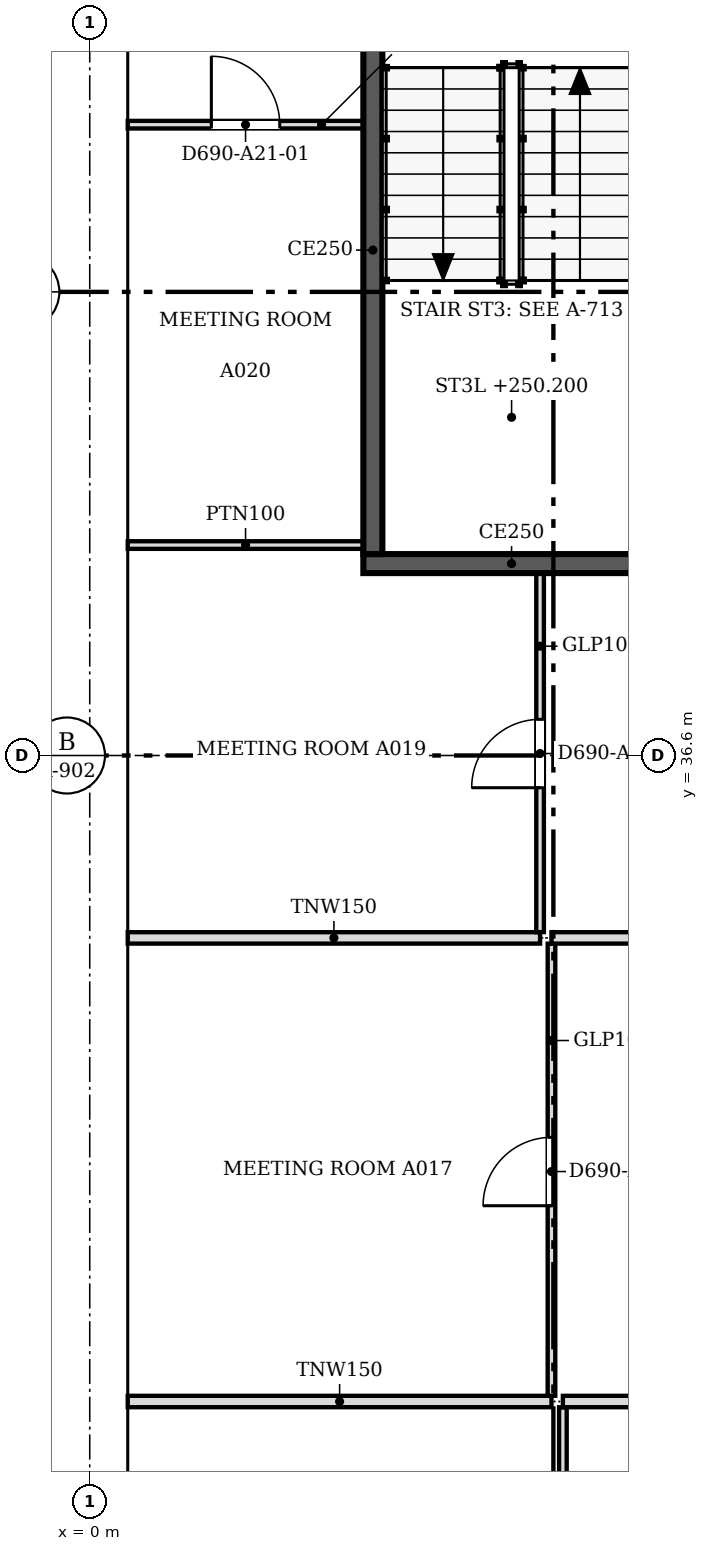
"""IFC4 building model, lengths in metres.
Left out: names, types, materials, properties, quantities, classifications, styles, units other than length and angle.
Written with IfcOpenShell. Run it as: python <this file> out.ifc"""

import sys

from ifc_helpers import new_model, si_unit, direction, frame, frame_2d, origin, place, context, subcontext, project, spatial, polyline, rectangle, outline, extrude, faceted_brep, source, transform, mapped, element, fill, save


model = new_model("IFC4")
c1 = context("Model", 3, precision=1e-05, world=origin(), true_north=direction((0.0, 1.0)))
c2 = subcontext(c1, "Body", "Model", "MODEL_VIEW")
j1 = project(units=[si_unit("LENGTHUNIT", "METRE"), si_unit("PLANEANGLEUNIT", "RADIAN")], contexts=[c1])
p1 = place(None, origin())
s1 = spatial("IfcSite", under=j1, at=p1, CompositionType="ELEMENT")
p2 = place(p1, origin())
s2 = spatial("IfcBuilding", under=s1, at=p2, CompositionType="ELEMENT")
p3 = place(p2, frame((0.0, 0.0, 248.3)))
s3 = spatial("IfcBuildingStorey", under=s2, at=p3, CompositionType="ELEMENT", Elevation=248.3)
m1 = source(origin(), c2, "Body", "Brep", [
    faceted_brep([(0.047, -0.25, 0.0), (3.05, -0.25, 3.8), (0.047, -0.25, 7.6), (0.0, -0.25, 7.54), (0.0, -0.25, 0.06), (0.093, 0.25, 7.541), (3.05, 0.25, 3.8), (0.093, 0.25, 0.059), (0.047, 0.0, 0.0), (0.047, 0.0, 7.6)], [[[0, 1, 2, 3, 4]], [[5, 6, 7]], [[7, 6, 1, 0, 8]], [[6, 5, 9, 2, 1]], [[3, 2, 9]], [[8, 0, 4]], [[7, 8, 4, 3, 9, 5]]]),
])
p4 = place(p3, frame((0.25, 48.8, -3.8), z_axis=(0.0, 0.0, 1.0), x_axis=(0.0, -1.0, 0.0)))
e1 = element("IfcWall", 1, at=p4, inside=s3, PredefinedType="SOLIDWALL", context=c2, shape_type="MappedRepresentation", body=[
    mapped(m1, transform((0.0, 0.0, 0.0), scale=1.0)),
])
m2 = source(origin(), c2, "Body", "SweptSolid", [
    extrude(outline(polyline([(0.247, 0.656), (2.731, 3.8), (0.247, 6.944), (0.247, 0.656)])), frame((0.0, 0.26, 0.0), z_axis=(0.0, -1.0, 0.0), x_axis=(1.0, 0.0, 0.0)), (0.0, 0.0, 1.0), 0.52),
])
p5 = place(p4, origin())
e2 = element("IfcOpeningElement", 2, at=p5, cuts=e1, PredefinedType="OPENING", context=c2, shape_type="MappedRepresentation", body=[
    mapped(m2, transform((0.0, 0.0, 0.0), scale=1.0)),
])
m3 = source(origin(), c2, "Body", "SweptSolid", [
    extrude(outline(polyline([(3.05, 0.0), (6.1, 3.8), (3.05, 7.6), (0.0, 3.8), (3.05, 0.0)])), frame((0.0, 0.25, 0.0), z_axis=(0.0, -1.0, 0.0), x_axis=(1.0, 0.0, 0.0)), (0.0, 0.0, 1.0), 0.5),
])
p6 = place(p3, frame((0.25, 45.75, -3.8), z_axis=(0.0, 0.0, 1.0), x_axis=(0.0, -1.0, 0.0)))
e3 = element("IfcWall", 3, at=p6, inside=s3, PredefinedType="SOLIDWALL", context=c2, shape_type="MappedRepresentation", body=[
    mapped(m3, transform((0.0, 0.0, 0.0), scale=1.0)),
])
m4 = source(origin(), c2, "Body", "SweptSolid", [
    extrude(outline(polyline([(3.05, 0.399), (5.78, 3.8), (3.05, 7.201), (0.321, 3.8), (3.05, 0.399)])), frame((0.0, 0.26, 0.0), z_axis=(0.0, -1.0, 0.0), x_axis=(1.0, 0.0, 0.0)), (0.0, 0.0, 1.0), 0.52),
])
p7 = place(p6, origin())
e4 = element("IfcOpeningElement", 4, at=p7, cuts=e3, PredefinedType="OPENING", context=c2, shape_type="MappedRepresentation", body=[
    mapped(m4, transform((0.0, 0.0, 0.0), scale=1.0)),
])
m5 = source(origin(), c2, "Body", "Brep", [
    faceted_brep([(3.05, -0.25, 0.0), (6.1, -0.25, 3.8), (6.1, -0.25, 3.8), (3.05, -0.25, 7.6), (0.0, -0.25, 3.8), (0.0, 0.25, 3.8), (3.05, 0.25, 7.6), (6.1, 0.25, 3.8), (6.1, 0.25, 3.8), (3.05, 0.25, 0.0)], [[[0, 1, 2, 3, 4]], [[5, 6, 7, 8, 9]], [[9, 8, 1, 0]], [[7, 6, 3, 2]], [[6, 5, 4, 3]], [[5, 9, 0, 4]], [[1, 8, 7, 2]]]),
])
p8 = place(p3, frame((0.25, 39.65, -3.8), z_axis=(0.0, 0.0, 1.0), x_axis=(0.0, -1.0, 0.0)))
e5 = element("IfcWall", 5, at=p8, inside=s3, PredefinedType="SOLIDWALL", context=c2, shape_type="MappedRepresentation", body=[
    mapped(m5, transform((0.0, 0.0, 0.0), scale=1.0)),
])
p9 = place(p8, origin())
e6 = element("IfcOpeningElement", 6, at=p9, cuts=e5, PredefinedType="OPENING", context=c2, shape_type="MappedRepresentation", body=[
    mapped(m4, transform((0.0, 0.0, 0.0), scale=1.0)),
])
p10 = place(p3, frame((0.25, 33.55, -3.8), z_axis=(0.0, 0.0, 1.0), x_axis=(0.0, -1.0, 0.0)))
e7 = element("IfcWall", 7, at=p10, inside=s3, PredefinedType="SOLIDWALL", context=c2, shape_type="MappedRepresentation", body=[
    mapped(m3, transform((0.0, 0.0, 0.0), scale=1.0)),
])
p11 = place(p10, origin())
e8 = element("IfcOpeningElement", 8, at=p11, cuts=e7, PredefinedType="OPENING", context=c2, shape_type="MappedRepresentation", body=[
    mapped(m4, transform((0.0, 0.0, 0.0), scale=1.0)),
])
m6 = source(origin(), c2, "Body", "Brep", [
    faceted_brep([(3.003, -0.25, 0.0), (3.05, -0.25, 0.06), (3.05, -0.25, 7.54), (3.003, -0.25, 7.6), (0.0, -0.25, 3.8), (0.0, 0.25, 3.8), (2.957, 0.25, 7.541), (2.957, 0.25, 0.059), (3.003, 0.0, 0.0), (3.003, 0.0, 7.6)], [[[0, 1, 2, 3, 4]], [[5, 6, 7]], [[1, 0, 8]], [[9, 3, 2]], [[6, 5, 4, 3, 9]], [[5, 7, 8, 0, 4]], [[1, 8, 7, 6, 9, 2]]]),
])
p12 = place(p3, frame((0.25, 27.45, -3.8), z_axis=(0.0, 0.0, 1.0), x_axis=(0.0, -1.0, 0.0)))
e9 = element("IfcWall", 9, at=p12, inside=s3, PredefinedType="SOLIDWALL", context=c2, shape_type="MappedRepresentation", body=[
    mapped(m6, transform((0.0, 0.0, 0.0), scale=1.0)),
])
m7 = source(origin(), c2, "Body", "SweptSolid", [
    extrude(outline(polyline([(2.803, 6.944), (0.319, 3.8), (2.803, 0.656), (2.803, 6.944)])), frame((0.0, 0.26, 0.0), z_axis=(0.0, -1.0, 0.0), x_axis=(1.0, 0.0, 0.0)), (0.0, 0.0, 1.0), 0.52),
])
p13 = place(p12, origin())
e10 = element("IfcOpeningElement", 10, at=p13, cuts=e9, PredefinedType="OPENING", context=c2, shape_type="MappedRepresentation", body=[
    mapped(m7, transform((0.0, 0.0, 0.0), scale=1.0)),
])
p14 = place(p2, frame((0.0, 0.0, 252.1)))
s4 = spatial("IfcBuildingStorey", under=s2, at=p14, CompositionType="ELEMENT", Elevation=252.1)
m8 = source(origin(), c2, "Body", "Brep", [
    faceted_brep([(3.003, -0.25, 0.0), (6.053, -0.25, 3.8), (3.003, -0.25, 7.6), (0.0, -0.25, 3.8), (0.047, 0.25, 3.859), (3.003, 0.25, 7.6), (6.053, 0.25, 3.8), (3.003, 0.25, 0.0), (0.047, 0.25, 3.741), (0.0, 0.0, 3.8)], [[[0, 1, 2, 3]], [[4, 5, 6, 7, 8]], [[7, 6, 1, 0]], [[6, 5, 2, 1]], [[5, 4, 9, 3, 2]], [[8, 7, 0, 3, 9]], [[8, 9, 4]]]),
])
p15 = place(p14, frame((0.25, 48.753, -3.8), z_axis=(0.0, 0.0, 1.0), x_axis=(0.0, -1.0, 0.0)))
e11 = element("IfcWall", 11, at=p15, inside=s4, PredefinedType="SOLIDWALL", context=c2, shape_type="MappedRepresentation", body=[
    mapped(m8, transform((0.0, 0.0, 0.0), scale=1.0)),
])
m9 = source(origin(), c2, "Body", "SweptSolid", [
    extrude(outline(polyline([(3.005, 0.401), (5.733, 3.8), (3.005, 7.199), (0.319, 3.8), (3.005, 0.401)])), frame((0.0, 0.26, 0.0), z_axis=(0.0, -1.0, 0.0), x_axis=(1.0, 0.0, 0.0)), (0.0, 0.0, 1.0), 0.52),
])
p16 = place(p15, origin())
e12 = element("IfcOpeningElement", 12, at=p16, cuts=e11, PredefinedType="OPENING", context=c2, shape_type="MappedRepresentation", body=[
    mapped(m9, transform((0.0, 0.0, 0.0), scale=1.0)),
])
m10 = source(origin(), c2, "Body", "Brep", [
    faceted_brep([(3.05, -0.25, 0.0), (6.1, -0.25, 3.8), (6.1, -0.25, 3.8), (3.05, -0.25, 7.6), (0.0, -0.25, 3.8), (0.0, 0.25, 3.8), (3.05, 0.25, 7.6), (6.1, 0.25, 3.8), (6.1, 0.25, 3.8), (3.05, 0.25, 0.0)], [[[0, 1, 2, 3, 4]], [[5, 6, 7, 8, 9]], [[9, 8, 1, 0]], [[7, 6, 3, 2]], [[6, 5, 4, 3]], [[5, 9, 0, 4]], [[1, 8, 7, 2]]]),
])
p17 = place(p14, frame((0.25, 42.7, -3.8), z_axis=(0.0, 0.0, 1.0), x_axis=(0.0, -1.0, 0.0)))
e13 = element("IfcWall", 13, at=p17, inside=s4, PredefinedType="SOLIDWALL", context=c2, shape_type="MappedRepresentation", body=[
    mapped(m10, transform((0.0, 0.0, 0.0), scale=1.0)),
])
m11 = source(origin(), c2, "Body", "SweptSolid", [
    extrude(outline(polyline([(3.05, 0.399), (5.78, 3.8), (3.05, 7.2), (0.321, 3.8), (3.05, 0.399)])), frame((0.0, 0.26, 0.0), z_axis=(0.0, -1.0, 0.0), x_axis=(1.0, 0.0, 0.0)), (0.0, 0.0, 1.0), 0.52),
])
p18 = place(p17, origin())
e14 = element("IfcOpeningElement", 14, at=p18, cuts=e13, PredefinedType="OPENING", context=c2, shape_type="MappedRepresentation", body=[
    mapped(m11, transform((0.0, 0.0, 0.0), scale=1.0)),
])
m12 = source(origin(), c2, "Body", "SweptSolid", [
    extrude(outline(polyline([(3.05, 0.0), (6.1, 3.8), (3.05, 7.6), (0.0, 3.8), (3.05, 0.0)])), frame((0.0, 0.25, 0.0), z_axis=(0.0, -1.0, 0.0), x_axis=(1.0, 0.0, 0.0)), (0.0, 0.0, 1.0), 0.5),
])
p19 = place(p14, frame((0.25, 36.6, -3.8), z_axis=(0.0, 0.0, 1.0), x_axis=(0.0, -1.0, 0.0)))
e15 = element("IfcWall", 15, at=p19, inside=s4, PredefinedType="SOLIDWALL", context=c2, shape_type="MappedRepresentation", body=[
    mapped(m12, transform((0.0, 0.0, 0.0), scale=1.0)),
])
p20 = place(p19, origin())
e16 = element("IfcOpeningElement", 16, at=p20, cuts=e15, PredefinedType="OPENING", context=c2, shape_type="MappedRepresentation", body=[
    mapped(m11, transform((0.0, 0.0, 0.0), scale=1.0)),
])
m13 = source(origin(), c2, "Body", "Brep", [
    faceted_brep([(3.05, -0.25, 0.0), (6.053, -0.25, 3.8), (3.05, -0.25, 7.6), (0.0, -0.25, 3.8), (0.0, 0.25, 3.8), (3.05, 0.25, 7.6), (6.007, 0.25, 3.859), (6.007, 0.25, 3.741), (3.05, 0.25, 0.0), (6.053, 0.0, 3.8)], [[[0, 1, 2, 3]], [[4, 5, 6, 7, 8]], [[8, 7, 9, 1, 0]], [[6, 5, 2, 1, 9]], [[5, 4, 3, 2]], [[4, 8, 0, 3]], [[7, 6, 9]]]),
])
p21 = place(p14, frame((0.25, 30.5, -3.8), z_axis=(0.0, 0.0, 1.0), x_axis=(0.0, -1.0, 0.0)))
e17 = element("IfcWall", 17, at=p21, inside=s4, PredefinedType="SOLIDWALL", context=c2, shape_type="MappedRepresentation", body=[
    mapped(m13, transform((0.0, 0.0, 0.0), scale=1.0)),
])
m14 = source(origin(), c2, "Body", "SweptSolid", [
    extrude(outline(polyline([(3.049, 0.401), (5.735, 3.8), (3.049, 7.199), (0.321, 3.8), (3.049, 0.401)])), frame((0.0, 0.26, 0.0), z_axis=(0.0, -1.0, 0.0), x_axis=(1.0, 0.0, 0.0)), (0.0, 0.0, 1.0), 0.52),
])
p22 = place(p21, origin())
e18 = element("IfcOpeningElement", 18, at=p22, cuts=e17, PredefinedType="OPENING", context=c2, shape_type="MappedRepresentation", body=[
    mapped(m14, transform((0.0, 0.0, 0.0), scale=1.0)),
])
p23 = place(p3, frame((7.5, 39.125, 0.0), z_axis=(0.0, 0.0, 1.0), x_axis=(-1.0, 0.0, 0.0)))
e19 = element("IfcWall", 19, at=p23, inside=s3, PredefinedType="SOLIDWALL", context=c2, shape_type="SweptSolid", body=[
    extrude(rectangle(XDim=3.9, YDim=0.25, at=frame_2d((1.95, 0.0))), origin(), (0.0, 0.0, 1.0), 3.8),
])
p24 = place(p3, frame((3.725, 39.25, 0.0), z_axis=(0.0, 0.0, 1.0), x_axis=(0.0, 1.0, 0.0)))
e20 = element("IfcWall", 20, at=p24, inside=s3, PredefinedType="SOLIDWALL", context=c2, shape_type="SweptSolid", body=[
    extrude(rectangle(XDim=8.0, YDim=0.25, at=frame_2d((4.0, 0.0))), origin(), (0.0, 0.0, 1.0), 3.8),
])
p25 = place(p3, frame((6.225, 22.0, 0.0), z_axis=(0.0, 0.0, 1.0), x_axis=(0.0, 1.0, 0.0)))
e21 = element("IfcWall", 21, at=p25, inside=s3, PredefinedType="PARTITIONING", context=c2, shape_type="SweptSolid", body=[
    extrude(rectangle(XDim=6.024, YDim=0.1, at=frame_2d((3.012, 0.0))), origin(), (0.0, 0.0, 1.0), 3.067),
])
p26 = place(p3, frame((0.5, 28.1, 0.0), z_axis=(0.0, 0.0, 1.0), x_axis=(1.0, 0.0, 0.0)))
e22 = element("IfcWall", 22, at=p26, inside=s3, PredefinedType="PARTITIONING", context=c2, shape_type="SweptSolid", body=[
    extrude(rectangle(XDim=5.575, YDim=0.15, at=frame_2d((2.788, 0.0))), origin(), (0.0, 0.0, 1.0), 3.067),
])
p27 = place(p3, frame((6.225, 28.1, 0.0), z_axis=(0.0, 0.0, 1.0), x_axis=(1.0, 0.0, 0.0)))
e23 = element("IfcWall", 23, at=p27, inside=s3, PredefinedType="PARTITIONING", context=c2, shape_type="SweptSolid", body=[
    extrude(rectangle(XDim=21.799, YDim=0.15, at=frame_2d((10.899, 0.0))), origin(), (0.0, 0.0, 1.0), 3.067),
])
p28 = place(p3, frame((6.075, 28.176, 0.0), z_axis=(0.0, 0.0, 1.0), x_axis=(0.0, 1.0, 0.0)))
e24 = element("IfcWall", 24, at=p28, inside=s3, PredefinedType="PARTITIONING", context=c2, shape_type="SweptSolid", body=[
    extrude(rectangle(XDim=5.948, YDim=0.1, at=frame_2d((2.974, 0.0))), origin(), (0.0, 0.0, 1.0), 3.067),
])
m15 = source(origin(), c2, "Body", "SweptSolid", [
    extrude(rectangle(XDim=0.9, YDim=2.1, at=frame_2d((0.45, 1.05))), frame((0.0, 0.06, 0.0), z_axis=(0.0, -1.0, 0.0), x_axis=(1.0, 0.0, 0.0)), (0.0, 0.0, 1.0), 0.12),
])
p29 = place(p28, frame((2.5, 0.0, 0.0)))
e25 = element("IfcOpeningElement", 25, at=p29, cuts=e24, PredefinedType="OPENING", context=c2, shape_type="MappedRepresentation", body=[
    mapped(m15, transform((0.0, 0.0, 0.0), scale=1.0)),
])
p30 = place(p3, frame((0.5, 34.2, 0.0), z_axis=(0.0, 0.0, 1.0), x_axis=(1.0, 0.0, 0.0)))
e26 = element("IfcWall", 26, at=p30, inside=s3, PredefinedType="PARTITIONING", context=c2, shape_type="SweptSolid", body=[
    extrude(rectangle(XDim=5.425, YDim=0.15, at=frame_2d((2.712, 0.0))), origin(), (0.0, 0.0, 1.0), 3.067),
])
p31 = place(p3, frame((6.075, 34.2, 0.0), z_axis=(0.0, 0.0, 1.0), x_axis=(1.0, 0.0, 0.0)))
e27 = element("IfcWall", 27, at=p31, inside=s3, PredefinedType="PARTITIONING", context=c2, shape_type="SweptSolid", body=[
    extrude(rectangle(XDim=21.949, YDim=0.15, at=frame_2d((10.975, 0.0))), origin(), (0.0, 0.0, 1.0), 3.067),
])
p32 = place(p3, frame((5.925, 34.276, 0.0), z_axis=(0.0, 0.0, 1.0), x_axis=(0.0, 1.0, 0.0)))
e28 = element("IfcWall", 28, at=p32, inside=s3, PredefinedType="PARTITIONING", context=c2, shape_type="SweptSolid", body=[
    extrude(rectangle(XDim=4.724, YDim=0.1, at=frame_2d((2.362, 0.0))), origin(), (0.0, 0.0, 1.0), 3.067),
])
p33 = place(p32, frame((1.9, 0.0, 0.0)))
e29 = element("IfcOpeningElement", 29, at=p33, cuts=e28, PredefinedType="OPENING", context=c2, shape_type="MappedRepresentation", body=[
    mapped(m15, transform((0.0, 0.0, 0.0), scale=1.0)),
])
p34 = place(p3, frame((0.5, 39.369, 0.0), z_axis=(0.0, 0.0, 1.0), x_axis=(1.0, 0.0, 0.0)))
e30 = element("IfcWall", 30, at=p34, inside=s3, PredefinedType="PARTITIONING", context=c2, shape_type="SweptSolid", body=[
    extrude(rectangle(XDim=3.1, YDim=0.1, at=frame_2d((1.55, 0.0))), origin(), (0.0, 0.0, 1.0), 3.067),
])
p35 = place(p3, frame((3.6, 44.9, 0.0), z_axis=(0.0, 0.0, 1.0), x_axis=(-1.0, 0.0, 0.0)))
e31 = element("IfcWall", 31, at=p35, inside=s3, PredefinedType="PARTITIONING", context=c2, shape_type="SweptSolid", body=[
    extrude(rectangle(XDim=3.1, YDim=0.1, at=frame_2d((1.55, 0.0))), origin(), (0.0, 0.0, 1.0), 3.067),
])
p36 = place(p35, frame((1.1, 0.0, 0.0)))
e32 = element("IfcOpeningElement", 32, at=p36, cuts=e31, PredefinedType="OPENING", context=c2, shape_type="MappedRepresentation", body=[
    mapped(m15, transform((0.0, 0.0, 0.0), scale=1.0)),
])
m16 = source(origin(), c2, "Body", "SweptSolid", [
    extrude(rectangle(XDim=0.9, YDim=2.1, at=frame_2d((0.45, 1.05))), frame((0.0, 0.025, 0.0), z_axis=(0.0, -1.0, 0.0), x_axis=(1.0, 0.0, 0.0)), (0.0, 0.0, 1.0), 0.05),
])
p37 = place(p36, origin())
e33 = element("IfcDoor", 33, at=p37, inside=s3, OperationType="SINGLE_SWING_RIGHT", PredefinedType="DOOR", context=c2, shape_type="MappedRepresentation", body=[
    mapped(m16, transform((0.0, 0.0, 0.0), scale=1.0)),
])
fill(e32, e33)
p38 = place(p33, origin())
e34 = element("IfcDoor", 34, at=p38, inside=s3, OperationType="SINGLE_SWING_LEFT", PredefinedType="DOOR", context=c2, shape_type="MappedRepresentation", body=[
    mapped(m16, transform((0.0, 0.0, 0.0), scale=1.0)),
])
fill(e29, e34)
p39 = place(p29, origin())
e35 = element("IfcDoor", 35, at=p39, inside=s3, OperationType="SINGLE_SWING_LEFT", PredefinedType="DOOR", context=c2, shape_type="MappedRepresentation", body=[
    mapped(m16, transform((0.0, 0.0, 0.0), scale=1.0)),
])
fill(e25, e35)
save(model, sys.argv[1])
